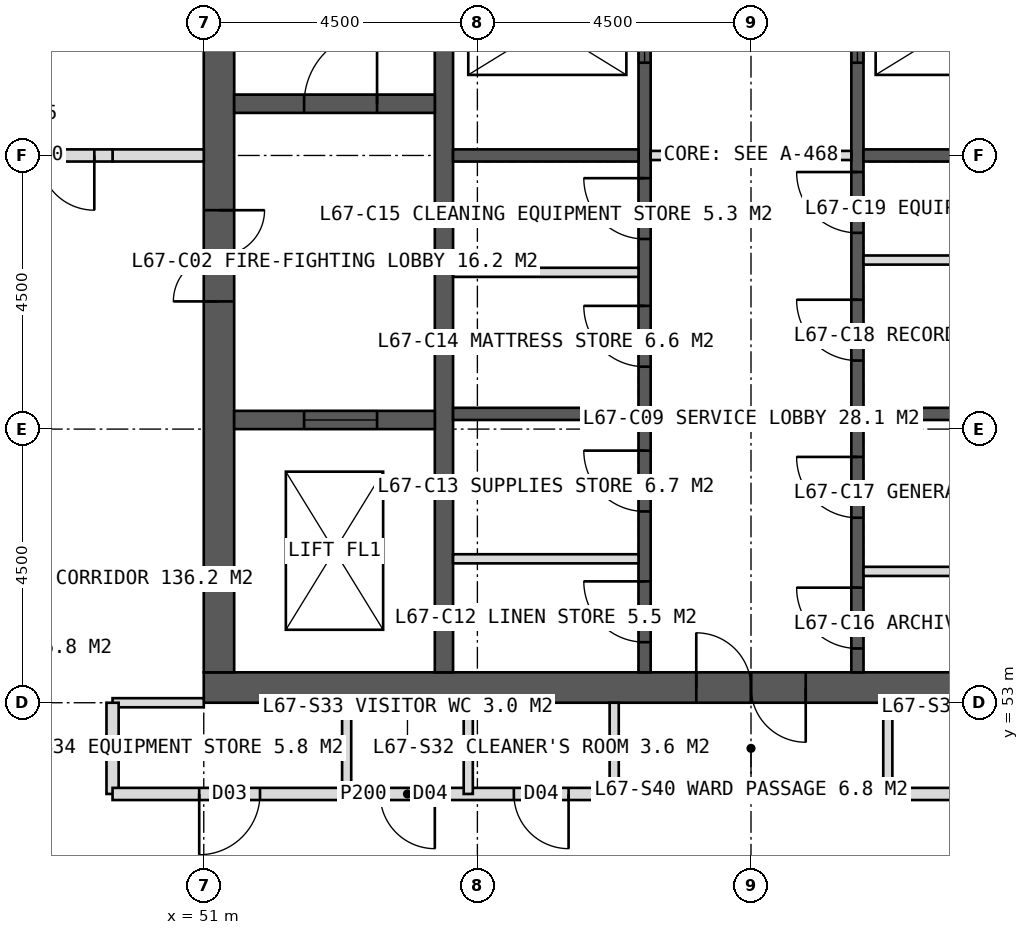
"""IFC4 building model, lengths in metres.
Left out: names, types, materials, properties, quantities, classifications, styles, units other than length and angle.
Written with IfcOpenShell. Run it as: python <this file> out.ifc"""

import sys

from ifc_helpers import new_model, si_unit, direction, frame, frame_2d, origin, place, context, subcontext, project, spatial, rectangle, extrude, element, fill, save


model = new_model("IFC4")
c1 = context("Model", 3, precision=1e-05, world=origin(), true_north=direction((0.0, 1.0)))
c2 = subcontext(c1, "Body", "Model", "MODEL_VIEW")
j1 = project(units=[si_unit("LENGTHUNIT", "METRE"), si_unit("PLANEANGLEUNIT", "RADIAN")], contexts=[c1])
p1 = place(None, origin())
s1 = spatial("IfcSite", under=j1, at=p1, CompositionType="ELEMENT")
p2 = place(p1, origin())
s2 = spatial("IfcBuilding", under=s1, at=p2, CompositionType="ELEMENT")
p3 = place(p2, frame((0.0, 0.0, 278.0)))
s3 = spatial("IfcBuildingStorey", under=s2, at=p3, CompositionType="ELEMENT", Elevation=278.0)
p4 = place(p3, frame((51.0, 53.25, 0.0), z_axis=(0.0, 0.0, 1.0), x_axis=(1.0, 0.0, 0.0)))
e1 = element("IfcWall", 1, at=p4, inside=s3, PredefinedType="SHEAR", context=c2, shape_type="SweptSolid", body=[
    extrude(rectangle(XDim=18.0, YDim=0.5, at=frame_2d((9.0, 0.0))), origin(), (0.0, 0.0, 1.0), 4.0),
])
p5 = place(p4, frame((8.1, 0.0, 0.0)))
e2 = element("IfcOpeningElement", 2, at=p5, cuts=e1, PredefinedType="OPENING", context=c2, shape_type="SweptSolid", body=[
    extrude(rectangle(XDim=1.8, YDim=2.2, at=frame_2d((0.9, 1.1))), frame((0.0, 0.26, 0.0), z_axis=(0.0, -1.0, 0.0), x_axis=(1.0, 0.0, 0.0)), (0.0, 0.0, 1.0), 0.52),
])
p6 = place(p3, frame((51.25, 53.5, 0.0), z_axis=(0.0, 0.0, 1.0), x_axis=(0.0, 1.0, 0.0)))
e3 = element("IfcWall", 3, at=p6, inside=s3, PredefinedType="SHEAR", context=c2, shape_type="SweptSolid", body=[
    extrude(rectangle(XDim=17.0, YDim=0.5, at=frame_2d((8.5, 0.0))), origin(), (0.0, 0.0, 1.0), 4.0),
])
p7 = place(p6, frame((6.1, 0.0, 0.0)))
e4 = element("IfcOpeningElement", 4, at=p7, cuts=e3, PredefinedType="OPENING", context=c2, shape_type="SweptSolid", body=[
    extrude(rectangle(XDim=1.5, YDim=2.2, at=frame_2d((0.75, 1.1))), frame((0.0, 0.26, 0.0), z_axis=(0.0, -1.0, 0.0), x_axis=(1.0, 0.0, 0.0)), (0.0, 0.0, 1.0), 0.52),
])
p8 = place(p3, frame((54.95, 53.5, 0.0), z_axis=(0.0, 0.0, 1.0), x_axis=(0.0, 1.0, 0.0)))
e5 = element("IfcWall", 5, at=p8, inside=s3, PredefinedType="SHEAR", context=c2, shape_type="SweptSolid", body=[
    extrude(rectangle(XDim=17.0, YDim=0.3, at=frame_2d((8.5, 0.0))), origin(), (0.0, 0.0, 1.0), 4.0),
])
p9 = place(p3, frame((58.25, 53.5, 0.0), z_axis=(0.0, 0.0, 1.0), x_axis=(0.0, 1.0, 0.0)))
e6 = element("IfcWall", 6, at=p9, inside=s3, PredefinedType="SHEAR", context=c2, shape_type="SweptSolid", body=[
    extrude(rectangle(XDim=17.0, YDim=0.2, at=frame_2d((8.5, 0.0))), origin(), (0.0, 0.0, 1.0), 4.0),
])
p10 = place(p9, frame((0.496, 0.0, 0.0)))
e7 = element("IfcOpeningElement", 7, at=p10, cuts=e6, PredefinedType="OPENING", context=c2, shape_type="SweptSolid", body=[
    extrude(rectangle(XDim=1.0, YDim=2.1, at=frame_2d((0.5, 1.05))), frame((0.0, 0.11, 0.0), z_axis=(0.0, -1.0, 0.0), x_axis=(1.0, 0.0, 0.0)), (0.0, 0.0, 1.0), 0.22),
])
p11 = place(p9, frame((2.646, 0.0, 0.0)))
e8 = element("IfcOpeningElement", 8, at=p11, cuts=e6, PredefinedType="OPENING", context=c2, shape_type="SweptSolid", body=[
    extrude(rectangle(XDim=1.0, YDim=2.1, at=frame_2d((0.5, 1.05))), frame((0.0, 0.11, 0.0), z_axis=(0.0, -1.0, 0.0), x_axis=(1.0, 0.0, 0.0)), (0.0, 0.0, 1.0), 0.22),
])
p12 = place(p9, frame((5.027, 0.0, 0.0)))
e9 = element("IfcOpeningElement", 9, at=p12, cuts=e6, PredefinedType="OPENING", context=c2, shape_type="SweptSolid", body=[
    extrude(rectangle(XDim=1.0, YDim=2.1, at=frame_2d((0.5, 1.05))), frame((0.0, 0.11, 0.0), z_axis=(0.0, -1.0, 0.0), x_axis=(1.0, 0.0, 0.0)), (0.0, 0.0, 1.0), 0.22),
])
p13 = place(p9, frame((7.126, 0.0, 0.0)))
e10 = element("IfcOpeningElement", 10, at=p13, cuts=e6, PredefinedType="OPENING", context=c2, shape_type="SweptSolid", body=[
    extrude(rectangle(XDim=1.0, YDim=2.1, at=frame_2d((0.5, 1.05))), frame((0.0, 0.11, 0.0), z_axis=(0.0, -1.0, 0.0), x_axis=(1.0, 0.0, 0.0)), (0.0, 0.0, 1.0), 0.22),
])
p14 = place(p9, frame((10.025, 0.0, 0.0)))
e11 = element("IfcOpeningElement", 11, at=p14, cuts=e6, PredefinedType="OPENING", context=c2, shape_type="SweptSolid", body=[
    extrude(rectangle(XDim=1.4, YDim=2.2, at=frame_2d((0.7, 1.1))), frame((0.0, 0.11, 0.0), z_axis=(0.0, -1.0, 0.0), x_axis=(1.0, 0.0, 0.0)), (0.0, 0.0, 1.0), 0.22),
])
p15 = place(p9, frame((14.325, 0.0, 0.0)))
e12 = element("IfcOpeningElement", 12, at=p15, cuts=e6, PredefinedType="OPENING", context=c2, shape_type="SweptSolid", body=[
    extrude(rectangle(XDim=1.4, YDim=2.2, at=frame_2d((0.7, 1.1))), frame((0.0, 0.11, 0.0), z_axis=(0.0, -1.0, 0.0), x_axis=(1.0, 0.0, 0.0)), (0.0, 0.0, 1.0), 0.22),
])
p16 = place(p3, frame((61.75, 53.5, 0.0), z_axis=(0.0, 0.0, 1.0), x_axis=(0.0, 1.0, 0.0)))
e13 = element("IfcWall", 13, at=p16, inside=s3, PredefinedType="SHEAR", context=c2, shape_type="SweptSolid", body=[
    extrude(rectangle(XDim=17.0, YDim=0.2, at=frame_2d((8.5, 0.0))), origin(), (0.0, 0.0, 1.0), 4.0),
])
p17 = place(p16, frame((0.393, 0.0, 0.0)))
e14 = element("IfcOpeningElement", 14, at=p17, cuts=e13, PredefinedType="OPENING", context=c2, shape_type="SweptSolid", body=[
    extrude(rectangle(XDim=1.0, YDim=2.1, at=frame_2d((0.5, 1.05))), frame((0.0, 0.11, 0.0), z_axis=(0.0, -1.0, 0.0), x_axis=(1.0, 0.0, 0.0)), (0.0, 0.0, 1.0), 0.22),
])
p18 = place(p16, frame((2.542, 0.0, 0.0)))
e15 = element("IfcOpeningElement", 15, at=p18, cuts=e13, PredefinedType="OPENING", context=c2, shape_type="SweptSolid", body=[
    extrude(rectangle(XDim=1.0, YDim=2.1, at=frame_2d((0.5, 1.05))), frame((0.0, 0.11, 0.0), z_axis=(0.0, -1.0, 0.0), x_axis=(1.0, 0.0, 0.0)), (0.0, 0.0, 1.0), 0.22),
])
p19 = place(p16, frame((5.127, 0.0, 0.0)))
e16 = element("IfcOpeningElement", 16, at=p19, cuts=e13, PredefinedType="OPENING", context=c2, shape_type="SweptSolid", body=[
    extrude(rectangle(XDim=1.0, YDim=2.1, at=frame_2d((0.5, 1.05))), frame((0.0, 0.11, 0.0), z_axis=(0.0, -1.0, 0.0), x_axis=(1.0, 0.0, 0.0)), (0.0, 0.0, 1.0), 0.22),
])
p20 = place(p16, frame((7.228, 0.0, 0.0)))
e17 = element("IfcOpeningElement", 17, at=p20, cuts=e13, PredefinedType="OPENING", context=c2, shape_type="SweptSolid", body=[
    extrude(rectangle(XDim=1.0, YDim=2.1, at=frame_2d((0.5, 1.05))), frame((0.0, 0.11, 0.0), z_axis=(0.0, -1.0, 0.0), x_axis=(1.0, 0.0, 0.0)), (0.0, 0.0, 1.0), 0.22),
])
p21 = place(p16, frame((10.025, 0.0, 0.0)))
e18 = element("IfcOpeningElement", 18, at=p21, cuts=e13, PredefinedType="OPENING", context=c2, shape_type="SweptSolid", body=[
    extrude(rectangle(XDim=1.4, YDim=2.2, at=frame_2d((0.7, 1.1))), frame((0.0, 0.11, 0.0), z_axis=(0.0, -1.0, 0.0), x_axis=(1.0, 0.0, 0.0)), (0.0, 0.0, 1.0), 0.22),
])
p22 = place(p16, frame((14.325, 0.0, 0.0)))
e19 = element("IfcOpeningElement", 19, at=p22, cuts=e13, PredefinedType="OPENING", context=c2, shape_type="SweptSolid", body=[
    extrude(rectangle(XDim=1.4, YDim=2.2, at=frame_2d((0.7, 1.1))), frame((0.0, 0.11, 0.0), z_axis=(0.0, -1.0, 0.0), x_axis=(1.0, 0.0, 0.0)), (0.0, 0.0, 1.0), 0.22),
])
for number, where, z_axis, x_axis in (
    (20, (55.1, 57.75, 0.0), (0.0, 0.0, 1.0), (1.0, 0.0, 0.0)),
    (21, (61.85, 57.75, 0.0), (0.0, 0.0, 1.0), (1.0, 0.0, 0.0)),
    (22, (55.1, 62.0, 0.0), (0.0, 0.0, 1.0), (1.0, 0.0, 0.0)),
    (23, (61.85, 62.0, 0.0), (0.0, 0.0, 1.0), (1.0, 0.0, 0.0)),
):
    element("IfcWall", number, at=place(p3, frame(where, z_axis=z_axis, x_axis=x_axis)), inside=s3, PredefinedType="SHEAR", context=c2, shape_type="SweptSolid", body=[
        extrude(rectangle(XDim=3.05, YDim=0.2, at=frame_2d((1.525, 0.0))), origin(), (0.0, 0.0, 1.0), 4.0),
    ])
p23 = place(p3, frame((51.5, 62.85, 0.0), z_axis=(0.0, 0.0, 1.0), x_axis=(1.0, 0.0, 0.0)))
e24 = element("IfcWall", 24, at=p23, inside=s3, PredefinedType="SHEAR", context=c2, shape_type="SweptSolid", body=[
    extrude(rectangle(XDim=3.3, YDim=0.3, at=frame_2d((1.65, 0.0))), origin(), (0.0, 0.0, 1.0), 4.0),
])
p24 = place(p23, frame((1.15, 0.0, 0.0)))
e25 = element("IfcOpeningElement", 25, at=p24, cuts=e24, PredefinedType="OPENING", context=c2, shape_type="SweptSolid", body=[
    extrude(rectangle(XDim=1.2, YDim=2.1, at=frame_2d((0.6, 1.05))), frame((0.0, 0.16, 0.0), z_axis=(0.0, -1.0, 0.0), x_axis=(1.0, 0.0, 0.0)), (0.0, 0.0, 1.0), 0.32),
])
p25 = place(p3, frame((51.5, 57.65, 0.0), z_axis=(0.0, 0.0, 1.0), x_axis=(1.0, 0.0, 0.0)))
e26 = element("IfcWall", 26, at=p25, inside=s3, PredefinedType="SHEAR", context=c2, shape_type="SweptSolid", body=[
    extrude(rectangle(XDim=3.3, YDim=0.3, at=frame_2d((1.65, 0.0))), origin(), (0.0, 0.0, 1.0), 4.0),
])
p26 = place(p25, frame((1.15, 0.0, 0.0)))
e27 = element("IfcOpeningElement", 27, at=p26, cuts=e26, PredefinedType="OPENING", context=c2, shape_type="SweptSolid", body=[
    extrude(rectangle(XDim=1.2, YDim=2.2, at=frame_2d((0.6, 1.1))), frame((0.0, 0.16, 0.0), z_axis=(0.0, -1.0, 0.0), x_axis=(1.0, 0.0, 0.0)), (0.0, 0.0, 1.0), 0.32),
])
p27 = place(p3, frame((51.0, 53.0, 0.0), z_axis=(0.0, 0.0, 1.0), x_axis=(-1.0, 0.0, 0.0)))
e28 = element("IfcWall", 28, at=p27, inside=s3, PredefinedType="PARTITIONING", context=c2, shape_type="SweptSolid", body=[
    extrude(rectangle(XDim=1.5, YDim=0.15, at=frame_2d((0.75, 0.0))), origin(), (0.0, 0.0, 1.0), 3.75),
])
p28 = place(p3, frame((51.0, 62.0, 0.0), z_axis=(0.0, 0.0, 1.0), x_axis=(-1.0, 0.0, 0.0)))
e29 = element("IfcWall", 29, at=p28, inside=s3, PredefinedType="SOLIDWALL", context=c2, shape_type="SweptSolid", body=[
    extrude(rectangle(XDim=1.5, YDim=0.2, at=frame_2d((0.75, 0.0))), origin(), (0.0, 0.0, 1.0), 2.75),
])
p29 = place(p3, frame((49.5, 51.5, 0.0), z_axis=(0.0, 0.0, 1.0), x_axis=(0.0, 1.0, 0.0)))
e30 = element("IfcWall", 30, at=p29, inside=s3, PredefinedType="PARTITIONING", context=c2, shape_type="SweptSolid", body=[
    extrude(rectangle(XDim=1.5, YDim=0.2, at=frame_2d((0.75, 0.0))), origin(), (0.0, 0.0, 1.0), 3.75),
])
p30 = place(p3, frame((70.5, 51.5, 0.0), z_axis=(0.0, 0.0, 1.0), x_axis=(-1.0, 0.0, 0.0)))
e31 = element("IfcWall", 31, at=p30, inside=s3, PredefinedType="PARTITIONING", context=c2, shape_type="SweptSolid", body=[
    extrude(rectangle(XDim=8.25, YDim=0.2, at=frame_2d((4.125, 0.0))), origin(), (0.0, 0.0, 1.0), 3.75),
])
p31 = place(p30, frame((2.05, 0.0, 0.0)))
e32 = element("IfcOpeningElement", 32, at=p31, cuts=e31, PredefinedType="OPENING", context=c2, shape_type="SweptSolid", body=[
    extrude(rectangle(XDim=0.9, YDim=2.1, at=frame_2d((0.45, 1.05))), frame((0.0, 0.11, 0.0), z_axis=(0.0, -1.0, 0.0), x_axis=(1.0, 0.0, 0.0)), (0.0, 0.0, 1.0), 0.22),
])
p32 = place(p30, frame((5.375, 0.0, 0.0)))
e33 = element("IfcOpeningElement", 33, at=p32, cuts=e31, PredefinedType="OPENING", context=c2, shape_type="SweptSolid", body=[
    extrude(rectangle(XDim=1.0, YDim=2.1, at=frame_2d((0.5, 1.05))), frame((0.0, 0.11, 0.0), z_axis=(0.0, -1.0, 0.0), x_axis=(1.0, 0.0, 0.0)), (0.0, 0.0, 1.0), 0.22),
])
p33 = place(p3, frame((57.75, 51.5, 0.0), z_axis=(0.0, 0.0, 1.0), x_axis=(-1.0, 0.0, 0.0)))
e34 = element("IfcWall", 34, at=p33, inside=s3, PredefinedType="PARTITIONING", context=c2, shape_type="SweptSolid", body=[
    extrude(rectangle(XDim=8.25, YDim=0.2, at=frame_2d((4.125, 0.0))), origin(), (0.0, 0.0, 1.0), 3.75),
])
p34 = place(p33, frame((0.75, 0.0, 0.0)))
e35 = element("IfcOpeningElement", 35, at=p34, cuts=e34, PredefinedType="OPENING", context=c2, shape_type="SweptSolid", body=[
    extrude(rectangle(XDim=0.9, YDim=2.1, at=frame_2d((0.45, 1.05))), frame((0.0, 0.11, 0.0), z_axis=(0.0, -1.0, 0.0), x_axis=(1.0, 0.0, 0.0)), (0.0, 0.0, 1.0), 0.22),
])
p35 = place(p33, frame((2.95, 0.0, 0.0)))
e36 = element("IfcOpeningElement", 36, at=p35, cuts=e34, PredefinedType="OPENING", context=c2, shape_type="SweptSolid", body=[
    extrude(rectangle(XDim=0.9, YDim=2.1, at=frame_2d((0.45, 1.05))), frame((0.0, 0.11, 0.0), z_axis=(0.0, -1.0, 0.0), x_axis=(1.0, 0.0, 0.0)), (0.0, 0.0, 1.0), 0.22),
])
p36 = place(p33, frame((5.825, 0.0, 0.0)))
e37 = element("IfcOpeningElement", 37, at=p36, cuts=e34, PredefinedType="OPENING", context=c2, shape_type="SweptSolid", body=[
    extrude(rectangle(XDim=1.0, YDim=2.1, at=frame_2d((0.5, 1.05))), frame((0.0, 0.11, 0.0), z_axis=(0.0, -1.0, 0.0), x_axis=(1.0, 0.0, 0.0)), (0.0, 0.0, 1.0), 0.22),
])
for number, where, z_axis, x_axis in (
    (38, (62.25, 53.0, 0.0), (0.0, 0.0, 1.0), (0.0, -1.0, 0.0)),
    (39, (57.75, 53.0, 0.0), (0.0, 0.0, 1.0), (0.0, -1.0, 0.0)),
):
    element("IfcWall", number, at=place(p3, frame(where, z_axis=z_axis, x_axis=x_axis)), inside=s3, PredefinedType="PARTITIONING", context=c2, shape_type="SweptSolid", body=[
        extrude(rectangle(XDim=1.5, YDim=0.15, at=frame_2d((0.75, 0.0))), origin(), (0.0, 0.0, 1.0), 3.75),
    ])
p37 = place(p3, frame((55.35, 53.0, 0.0), z_axis=(0.0, 0.0, 1.0), x_axis=(0.0, -1.0, 0.0)))
e40 = element("IfcWall", 40, at=p37, inside=s3, PredefinedType="PARTITIONING", context=c2, shape_type="SweptSolid", body=[
    extrude(rectangle(XDim=1.5, YDim=0.15, at=frame_2d((0.75, 0.0))), origin(), (0.0, 0.0, 1.0), 2.95),
])
p38 = place(p3, frame((53.35, 53.0, 0.0), z_axis=(0.0, 0.0, 1.0), x_axis=(0.0, -1.0, 0.0)))
e41 = element("IfcWall", 41, at=p38, inside=s3, PredefinedType="PARTITIONING", context=c2, shape_type="SweptSolid", body=[
    extrude(rectangle(XDim=1.5, YDim=0.15, at=frame_2d((0.75, 0.0))), origin(), (0.0, 0.0, 1.0), 3.75),
])
p39 = place(p3, frame((49.5, 62.0, 0.0), z_axis=(0.0, 0.0, 1.0), x_axis=(-1.0, 0.0, 0.0)))
e42 = element("IfcWall", 42, at=p39, inside=s3, PredefinedType="SOLIDWALL", context=c2, shape_type="SweptSolid", body=[
    extrude(rectangle(XDim=2.6, YDim=0.2, at=frame_2d((1.3, 0.0))), origin(), (0.0, 0.0, 1.0), 2.75),
])
p40 = place(p39, frame((0.3, 0.0, 0.0)))
e43 = element("IfcOpeningElement", 43, at=p40, cuts=e42, PredefinedType="OPENING", context=c2, shape_type="SweptSolid", body=[
    extrude(rectangle(XDim=1.8, YDim=2.2, at=frame_2d((0.9, 1.1))), frame((0.0, 0.11, 0.0), z_axis=(0.0, -1.0, 0.0), x_axis=(1.0, 0.0, 0.0)), (0.0, 0.0, 1.0), 0.22),
])
for number, where, z_axis, x_axis in (
    (44, (55.1, 55.367, 0.0), (0.0, 0.0, 1.0), (1.0, 0.0, 0.0)),
    (45, (61.85, 55.16, 0.0), (0.0, 0.0, 1.0), (1.0, 0.0, 0.0)),
    (46, (55.1, 60.078, 0.0), (0.0, 0.0, 1.0), (1.0, 0.0, 0.0)),
    (47, (61.85, 60.28, 0.0), (0.0, 0.0, 1.0), (1.0, 0.0, 0.0)),
):
    element("IfcWall", number, at=place(p3, frame(where, z_axis=z_axis, x_axis=x_axis)), inside=s3, PredefinedType="PARTITIONING", context=c2, shape_type="SweptSolid", body=[
        extrude(rectangle(XDim=3.05, YDim=0.15, at=frame_2d((1.525, 0.0))), origin(), (0.0, 0.0, 1.0), 3.75),
    ])
p41 = place(p3, frame((58.35, 62.0, 0.0), z_axis=(0.0, 0.0, 1.0), x_axis=(1.0, 0.0, 0.0)))
e48 = element("IfcWall", 48, at=p41, inside=s3, PredefinedType="PARTITIONING", context=c2, shape_type="SweptSolid", body=[
    extrude(rectangle(XDim=3.3, YDim=0.15, at=frame_2d((1.65, 0.0))), origin(), (0.0, 0.0, 1.0), 3.75),
])
p42 = place(p34, origin())
e49 = element("IfcDoor", 49, at=p42, inside=s3, OperationType="SINGLE_SWING_LEFT", PredefinedType="DOOR", context=c2, shape_type="SweptSolid", body=[
    extrude(rectangle(XDim=0.9, YDim=2.1, at=frame_2d((0.45, 1.05))), frame((0.0, 0.025, 0.0), z_axis=(0.0, -1.0, 0.0), x_axis=(1.0, 0.0, 0.0)), (0.0, 0.0, 1.0), 0.05),
])
fill(e35, e49)
p43 = place(p35, origin())
e50 = element("IfcDoor", 50, at=p43, inside=s3, OperationType="SINGLE_SWING_LEFT", PredefinedType="DOOR", context=c2, shape_type="SweptSolid", body=[
    extrude(rectangle(XDim=0.9, YDim=2.1, at=frame_2d((0.45, 1.05))), frame((0.0, 0.025, 0.0), z_axis=(0.0, -1.0, 0.0), x_axis=(1.0, 0.0, 0.0)), (0.0, 0.0, 1.0), 0.05),
])
fill(e36, e50)
p44 = place(p36, origin())
e51 = element("IfcDoor", 51, at=p44, inside=s3, OperationType="SINGLE_SWING_RIGHT", PredefinedType="DOOR", context=c2, shape_type="SweptSolid", body=[
    extrude(rectangle(XDim=1.0, YDim=2.1, at=frame_2d((0.5, 1.05))), frame((0.0, 0.025, 0.0), z_axis=(0.0, -1.0, 0.0), x_axis=(1.0, 0.0, 0.0)), (0.0, 0.0, 1.0), 0.05),
])
fill(e37, e51)
p45 = place(p40, origin())
e52 = element("IfcDoor", 52, at=p45, inside=s3, OperationType="DOUBLE_DOOR_DOUBLE_SWING", PredefinedType="DOOR", context=c2, shape_type="SweptSolid", body=[
    extrude(rectangle(XDim=1.8, YDim=2.2, at=frame_2d((0.9, 1.1))), frame((0.0, 0.025, 0.0), z_axis=(0.0, -1.0, 0.0), x_axis=(1.0, 0.0, 0.0)), (0.0, 0.0, 1.0), 0.05),
])
fill(e43, e52)
p46 = place(p7, origin())
e53 = element("IfcDoor", 53, at=p46, inside=s3, OperationType="DOUBLE_DOOR_SINGLE_SWING", PredefinedType="DOOR", context=c2, shape_type="SweptSolid", body=[
    extrude(rectangle(XDim=1.5, YDim=2.2, at=frame_2d((0.75, 1.1))), frame((0.0, 0.025, 0.0), z_axis=(0.0, -1.0, 0.0), x_axis=(1.0, 0.0, 0.0)), (0.0, 0.0, 1.0), 0.05),
])
fill(e4, e53)
p47 = place(p24, origin())
e54 = element("IfcDoor", 54, at=p47, inside=s3, OperationType="SINGLE_SWING_RIGHT", PredefinedType="DOOR", context=c2, shape_type="SweptSolid", body=[
    extrude(rectangle(XDim=1.2, YDim=2.1, at=frame_2d((0.6, 1.05))), frame((0.0, 0.025, 0.0), z_axis=(0.0, -1.0, 0.0), x_axis=(1.0, 0.0, 0.0)), (0.0, 0.0, 1.0), 0.05),
])
fill(e25, e54)
p48 = place(p26, origin())
e55 = element("IfcDoor", 55, at=p48, inside=s3, OperationType="SLIDING_TO_LEFT", PredefinedType="DOOR", context=c2, shape_type="SweptSolid", body=[
    extrude(rectangle(XDim=1.2, YDim=2.2, at=frame_2d((0.6, 1.1))), frame((0.0, 0.025, 0.0), z_axis=(0.0, -1.0, 0.0), x_axis=(1.0, 0.0, 0.0)), (0.0, 0.0, 1.0), 0.05),
])
fill(e27, e55)
p49 = place(p10, origin())
e56 = element("IfcDoor", 56, at=p49, inside=s3, OperationType="SINGLE_SWING_RIGHT", PredefinedType="DOOR", context=c2, shape_type="SweptSolid", body=[
    extrude(rectangle(XDim=1.0, YDim=2.1, at=frame_2d((0.5, 1.05))), frame((0.0, 0.025, 0.0), z_axis=(0.0, -1.0, 0.0), x_axis=(1.0, 0.0, 0.0)), (0.0, 0.0, 1.0), 0.05),
])
fill(e7, e56)
p50 = place(p11, origin())
e57 = element("IfcDoor", 57, at=p50, inside=s3, OperationType="SINGLE_SWING_RIGHT", PredefinedType="DOOR", context=c2, shape_type="SweptSolid", body=[
    extrude(rectangle(XDim=1.0, YDim=2.1, at=frame_2d((0.5, 1.05))), frame((0.0, 0.025, 0.0), z_axis=(0.0, -1.0, 0.0), x_axis=(1.0, 0.0, 0.0)), (0.0, 0.0, 1.0), 0.05),
])
fill(e8, e57)
p51 = place(p17, origin())
e58 = element("IfcDoor", 58, at=p51, inside=s3, OperationType="SINGLE_SWING_RIGHT", PredefinedType="DOOR", context=c2, shape_type="SweptSolid", body=[
    extrude(rectangle(XDim=1.0, YDim=2.1, at=frame_2d((0.5, 1.05))), frame((0.0, 0.025, 0.0), z_axis=(0.0, -1.0, 0.0), x_axis=(1.0, 0.0, 0.0)), (0.0, 0.0, 1.0), 0.05),
])
fill(e14, e58)
p52 = place(p18, origin())
e59 = element("IfcDoor", 59, at=p52, inside=s3, OperationType="SINGLE_SWING_RIGHT", PredefinedType="DOOR", context=c2, shape_type="SweptSolid", body=[
    extrude(rectangle(XDim=1.0, YDim=2.1, at=frame_2d((0.5, 1.05))), frame((0.0, 0.025, 0.0), z_axis=(0.0, -1.0, 0.0), x_axis=(1.0, 0.0, 0.0)), (0.0, 0.0, 1.0), 0.05),
])
fill(e15, e59)
p53 = place(p12, origin())
e60 = element("IfcDoor", 60, at=p53, inside=s3, OperationType="SINGLE_SWING_RIGHT", PredefinedType="DOOR", context=c2, shape_type="SweptSolid", body=[
    extrude(rectangle(XDim=1.0, YDim=2.1, at=frame_2d((0.5, 1.05))), frame((0.0, 0.025, 0.0), z_axis=(0.0, -1.0, 0.0), x_axis=(1.0, 0.0, 0.0)), (0.0, 0.0, 1.0), 0.05),
])
fill(e9, e60)
p54 = place(p13, origin())
e61 = element("IfcDoor", 61, at=p54, inside=s3, OperationType="SINGLE_SWING_RIGHT", PredefinedType="DOOR", context=c2, shape_type="SweptSolid", body=[
    extrude(rectangle(XDim=1.0, YDim=2.1, at=frame_2d((0.5, 1.05))), frame((0.0, 0.025, 0.0), z_axis=(0.0, -1.0, 0.0), x_axis=(1.0, 0.0, 0.0)), (0.0, 0.0, 1.0), 0.05),
])
fill(e10, e61)
p55 = place(p19, origin())
e62 = element("IfcDoor", 62, at=p55, inside=s3, OperationType="SINGLE_SWING_RIGHT", PredefinedType="DOOR", context=c2, shape_type="SweptSolid", body=[
    extrude(rectangle(XDim=1.0, YDim=2.1, at=frame_2d((0.5, 1.05))), frame((0.0, 0.025, 0.0), z_axis=(0.0, -1.0, 0.0), x_axis=(1.0, 0.0, 0.0)), (0.0, 0.0, 1.0), 0.05),
])
fill(e16, e62)
p56 = place(p20, origin())
e63 = element("IfcDoor", 63, at=p56, inside=s3, OperationType="SINGLE_SWING_RIGHT", PredefinedType="DOOR", context=c2, shape_type="SweptSolid", body=[
    extrude(rectangle(XDim=1.0, YDim=2.1, at=frame_2d((0.5, 1.05))), frame((0.0, 0.025, 0.0), z_axis=(0.0, -1.0, 0.0), x_axis=(1.0, 0.0, 0.0)), (0.0, 0.0, 1.0), 0.05),
])
fill(e17, e63)
p57 = place(p14, origin())
e64 = element("IfcDoor", 64, at=p57, inside=s3, OperationType="SLIDING_TO_LEFT", PredefinedType="DOOR", context=c2, shape_type="SweptSolid", body=[
    extrude(rectangle(XDim=1.4, YDim=2.2, at=frame_2d((0.7, 1.1))), frame((0.0, 0.025, 0.0), z_axis=(0.0, -1.0, 0.0), x_axis=(1.0, 0.0, 0.0)), (0.0, 0.0, 1.0), 0.05),
])
fill(e11, e64)
p58 = place(p21, origin())
e65 = element("IfcDoor", 65, at=p58, inside=s3, OperationType="SLIDING_TO_LEFT", PredefinedType="DOOR", context=c2, shape_type="SweptSolid", body=[
    extrude(rectangle(XDim=1.4, YDim=2.2, at=frame_2d((0.7, 1.1))), frame((0.0, 0.025, 0.0), z_axis=(0.0, -1.0, 0.0), x_axis=(1.0, 0.0, 0.0)), (0.0, 0.0, 1.0), 0.05),
])
fill(e18, e65)
p59 = place(p5, origin())
e66 = element("IfcDoor", 66, at=p59, inside=s3, OperationType="DOUBLE_DOOR_SINGLE_SWING", PredefinedType="DOOR", context=c2, shape_type="SweptSolid", body=[
    extrude(rectangle(XDim=1.8, YDim=2.2, at=frame_2d((0.9, 1.1))), frame((0.0, 0.025, 0.0), z_axis=(0.0, -1.0, 0.0), x_axis=(1.0, 0.0, 0.0)), (0.0, 0.0, 1.0), 0.05),
])
fill(e2, e66)
save(model, sys.argv[1])
